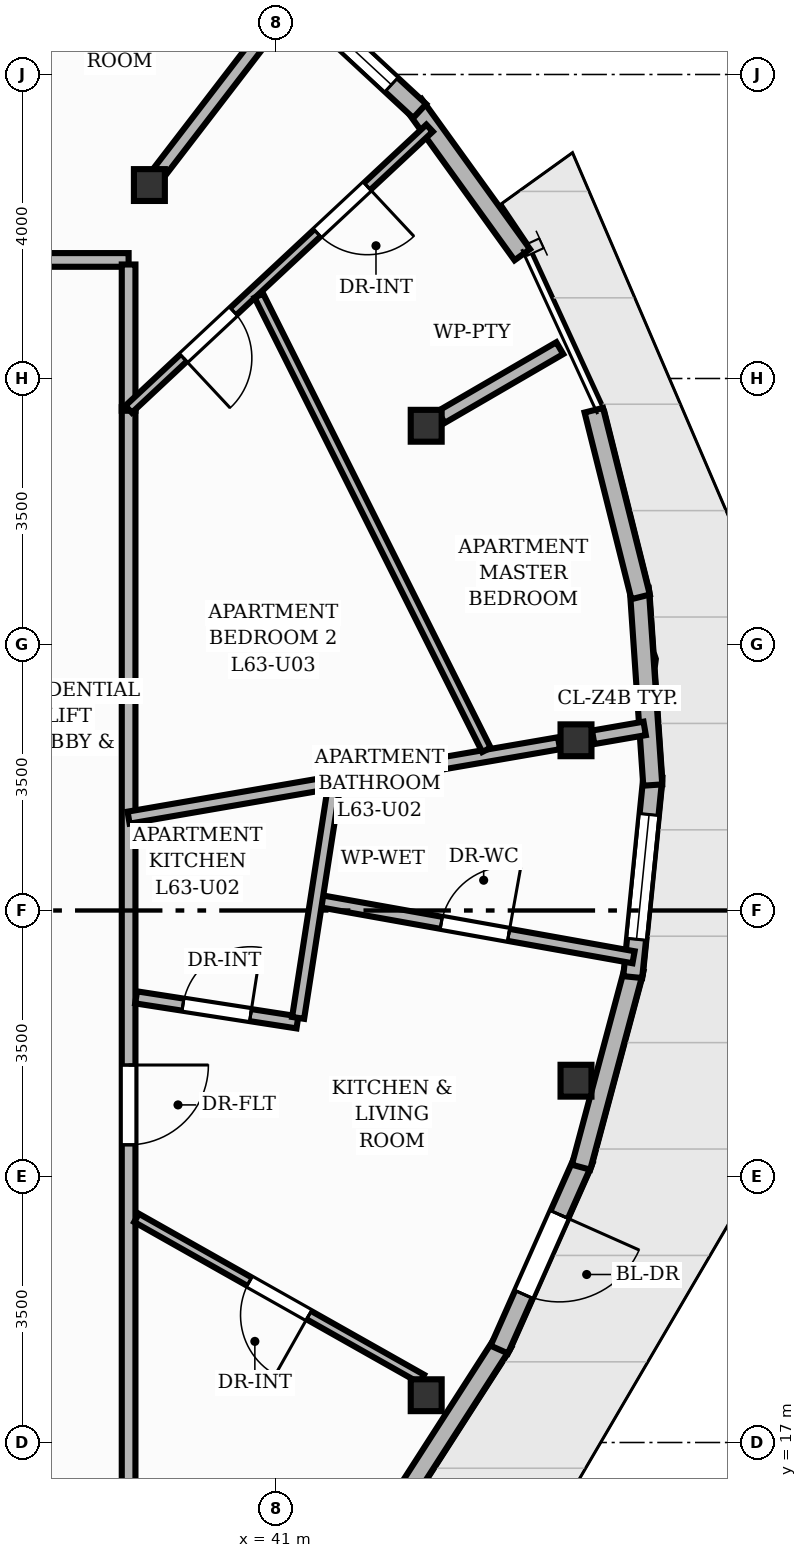
"""IFC4 building model, lengths in metres.
Left out: names, types, materials, properties, quantities, classifications, styles, units other than length and angle.
Written with IfcOpenShell. Run it as: python <this file> out.ifc"""

import sys

from ifc_helpers import new_model, si_unit, direction, frame, frame_2d, origin, origin_2d, place, context, subcontext, project, spatial, rectangle, i_section, extrude, element, fill, save


model = new_model("IFC4")
c1 = context("Model", 3, precision=1e-05, world=origin(), true_north=direction((0.0, 1.0)))
c2 = subcontext(c1, "Body", "Model", "MODEL_VIEW")
j1 = project(units=[si_unit("LENGTHUNIT", "METRE"), si_unit("PLANEANGLEUNIT", "RADIAN")], contexts=[c1])
p1 = place(None, origin())
s1 = spatial("IfcSite", under=j1, at=p1, CompositionType="ELEMENT")
p2 = place(p1, origin())
s2 = spatial("IfcBuilding", under=s1, at=p2, CompositionType="ELEMENT")
p3 = place(p2, frame((0.0, 0.0, 211.04)))
s3 = spatial("IfcBuildingStorey", under=s2, at=p3, CompositionType="ELEMENT", Elevation=211.04)
for number, where, z_axis, x_axis in (
    (1, (44.946, 26.24, 0.0), (0.0, 0.0, 1.0), (1.0, 0.0, 0.0)),
    (2, (42.975, 30.378, 0.0), (0.0, 0.0, 1.0), (1.0, 0.0, 0.0)),
    (3, (39.333, 33.545, 0.0), (0.0, 0.0, 1.0), (1.0, 0.0, 0.0)),
    (4, (42.975, 17.622, 0.0), (0.0, 0.0, 1.0), (1.0, 0.0, 0.0)),
    (5, (44.946, 21.76, 0.0), (0.0, 0.0, 1.0), (1.0, 0.0, 0.0)),
):
    element("IfcColumn", number, at=place(p3, frame(where, z_axis=z_axis, x_axis=x_axis)), inside=s3, PredefinedType="COLUMN", context=c2, shape_type="SweptSolid", body=[
        extrude(i_section(OverallWidth=0.407, OverallDepth=0.419, WebThickness=0.031, FlangeThickness=0.049, at=origin_2d()), origin(), (0.0, 0.0, 1.0), 3.2),
    ])
p4 = place(p3, frame((43.988, 18.319, 0.0), z_axis=(0.0, 0.0, 1.0), x_axis=(-0.540690479286, -0.841221615039, 0.0)))
e6 = element("IfcWall", 6, at=p4, inside=s3, PredefinedType="SOLIDWALL", context=c2, shape_type="SweptSolid", body=[
    extrude(rectangle(XDim=2.758, YDim=0.25, at=frame_2d((1.379, 0.0))), origin(), (0.0, 0.0, 1.0), 2.96),
])
p5 = place(p3, frame((45.049, 20.726, 0.0), z_axis=(0.0, 0.0, 1.0), x_axis=(-0.40624599189, -0.913763751783, 0.0)))
e7 = element("IfcWall", 7, at=p5, inside=s3, PredefinedType="SOLIDWALL", context=c2, shape_type="SweptSolid", body=[
    extrude(rectangle(XDim=2.739, YDim=0.25, at=frame_2d((1.369, 0.0))), origin(), (0.0, 0.0, 1.0), 2.96),
])
p6 = place(p5, frame((0.794, 0.0, 0.0)))
e8 = element("IfcOpeningElement", 8, at=p6, cuts=e7, PredefinedType="OPENING", context=c2, shape_type="SweptSolid", body=[
    extrude(rectangle(XDim=1.15, YDim=2.2, at=frame_2d((0.575, 1.1))), frame((0.0, 0.135, 0.0), z_axis=(0.0, -1.0, 0.0), x_axis=(1.0, 0.0, 0.0)), (0.0, 0.0, 1.0), 0.27),
])
p7 = place(p3, frame((45.712, 23.232, 0.0), z_axis=(0.0, 0.0, 1.0), x_axis=(-0.259023691836, -0.965870968126, 0.0)))
e9 = element("IfcWall", 9, at=p7, inside=s3, PredefinedType="SOLIDWALL", context=c2, shape_type="SweptSolid", body=[
    extrude(rectangle(XDim=2.701, YDim=0.25, at=frame_2d((1.351, 0.0))), origin(), (0.0, 0.0, 1.0), 2.577),
])
p8 = place(p3, frame((45.958, 25.761, 0.0), z_axis=(0.0, 0.0, 1.0), x_axis=(-0.100196668354, -0.99496765156, 0.0)))
e10 = element("IfcWall", 10, at=p8, inside=s3, PredefinedType="SOLIDWALL", context=c2, shape_type="SweptSolid", body=[
    extrude(rectangle(XDim=2.651, YDim=0.25, at=frame_2d((1.326, 0.0))), origin(), (0.0, 0.0, 1.0), 2.96),
])
p9 = place(p8, frame((0.501, 0.0, 0.85)))
e11 = element("IfcOpeningElement", 11, at=p9, cuts=e10, PredefinedType="OPENING", context=c2, shape_type="SweptSolid", body=[
    extrude(rectangle(XDim=1.65, YDim=1.55, at=frame_2d((0.825, 0.775))), frame((0.0, 0.135, 0.0), z_axis=(0.0, -1.0, 0.0), x_axis=(1.0, 0.0, 0.0)), (0.0, 0.0, 1.0), 0.27),
])
p10 = place(p3, frame((45.779, 28.237, 0.0), z_axis=(0.0, 0.0, 1.0), x_axis=(0.068469168344, -0.997653232835, 0.0)))
e12 = element("IfcWall", 12, at=p10, inside=s3, PredefinedType="SOLIDWALL", context=c2, shape_type="SweptSolid", body=[
    extrude(rectangle(XDim=2.592, YDim=0.25, at=frame_2d((1.296, 0.0))), origin(), (0.0, 0.0, 1.0), 2.96),
])
p11 = place(p3, frame((45.18, 30.583, 0.0), z_axis=(0.0, 0.0, 1.0), x_axis=(0.243170809566, -0.969983483042, 0.0)))
e13 = element("IfcWall", 13, at=p11, inside=s3, PredefinedType="SOLIDWALL", context=c2, shape_type="SweptSolid", body=[
    extrude(rectangle(XDim=2.532, YDim=0.25, at=frame_2d((1.266, 0.0))), origin(), (0.0, 0.0, 1.0), 2.96),
])
p12 = place(p3, frame((42.814, 34.605, 0.0), z_axis=(0.0, 0.0, 1.0), x_axis=(0.584824573101, -0.811159798497, 0.0)))
e14 = element("IfcWall", 14, at=p12, inside=s3, PredefinedType="SOLIDWALL", context=c2, shape_type="SweptSolid", body=[
    extrude(rectangle(XDim=2.437, YDim=0.25, at=frame_2d((1.218, 0.0))), origin(), (0.0, 0.0, 1.0), 2.96),
])
p13 = place(p3, frame((41.119, 36.161, 0.0), z_axis=(0.0, 0.0, 1.0), x_axis=(0.733441361842, -0.679752726173, 0.0)))
e15 = element("IfcWall", 15, at=p13, inside=s3, PredefinedType="SOLIDWALL", context=c2, shape_type="SweptSolid", body=[
    extrude(rectangle(XDim=2.415, YDim=0.25, at=frame_2d((1.207, 0.0))), origin(), (0.0, 0.0, 1.0), 2.96),
])
p14 = place(p13, frame((0.507, 0.0, 0.85)))
e16 = element("IfcOpeningElement", 16, at=p14, cuts=e15, PredefinedType="OPENING", context=c2, shape_type="SweptSolid", body=[
    extrude(rectangle(XDim=1.4, YDim=1.55, at=frame_2d((0.7, 0.775))), frame((0.0, 0.135, 0.0), z_axis=(0.0, -1.0, 0.0), x_axis=(1.0, 0.0, 0.0)), (0.0, 0.0, 1.0), 0.27),
])
p15 = place(p3, frame((45.173, 26.279, 0.0), z_axis=(0.0, 0.0, 1.0), x_axis=(0.985357392461, 0.170501639647, 0.0)))
e17 = element("IfcWall", 17, at=p15, inside=s3, PredefinedType="PARTITIONING", context=c2, shape_type="SweptSolid", body=[
    extrude(rectangle(XDim=0.687, YDim=0.18, at=frame_2d((0.344, 0.0))), origin(), (0.0, 0.0, 1.0), 2.403),
])
p16 = place(p3, frame((43.174, 30.493, 0.0), z_axis=(0.0, 0.0, 1.0), x_axis=(0.864637155841, 0.502396843879, 0.0)))
e18 = element("IfcWall", 18, at=p16, inside=s3, PredefinedType="PARTITIONING", context=c2, shape_type="SweptSolid", body=[
    extrude(rectangle(XDim=1.803, YDim=0.18, at=frame_2d((0.901, 0.0))), origin(), (0.0, 0.0, 1.0), 2.403),
])
p17 = place(p3, frame((39.473, 33.727, 0.0), z_axis=(0.0, 0.0, 1.0), x_axis=(0.609244614772, 0.792982344931, 0.0)))
e19 = element("IfcWall", 19, at=p17, inside=s3, PredefinedType="PARTITIONING", context=c2, shape_type="SweptSolid", body=[
    extrude(rectangle(XDim=2.861, YDim=0.18, at=frame_2d((1.43, 0.0))), origin(), (0.0, 0.0, 1.0), 2.403),
])
p18 = place(p3, frame((39.06, 30.623, 0.0), z_axis=(0.0, 0.0, 1.0), x_axis=(0.0, -1.0, 0.0)))
e20 = element("IfcWall", 20, at=p18, inside=s3, PredefinedType="PARTITIONING", context=c2, shape_type="SweptSolid", body=[
    extrude(rectangle(XDim=15.183, YDim=0.18, at=frame_2d((7.591, 0.0))), origin(), (0.0, 0.0, 1.0), 2.955),
])
p19 = place(p18, frame((8.656, 0.0, 0.0)))
e21 = element("IfcOpeningElement", 21, at=p19, cuts=e20, PredefinedType="OPENING", context=c2, shape_type="SweptSolid", body=[
    extrude(rectangle(XDim=1.05, YDim=2.15, at=frame_2d((0.525, 1.075))), frame((0.0, 0.1, 0.0), z_axis=(0.0, -1.0, 0.0), x_axis=(1.0, 0.0, 0.0)), (0.0, 0.0, 1.0), 0.2),
])
p20 = place(p3, frame((33.2, 32.56, 0.0), z_axis=(0.0, 0.0, 1.0), x_axis=(1.0, 0.0, 0.0)))
e22 = element("IfcWall", 22, at=p20, inside=s3, PredefinedType="PARTITIONING", context=c2, shape_type="SweptSolid", body=[
    extrude(rectangle(XDim=5.86, YDim=0.18, at=frame_2d((2.93, 0.0))), origin(), (0.0, 0.0, 1.0), 2.955),
])
p21 = place(p20, frame((3.227, 0.0, 0.0)))
e23 = element("IfcOpeningElement", 23, at=p21, cuts=e22, PredefinedType="OPENING", context=c2, shape_type="SweptSolid", body=[
    extrude(rectangle(XDim=1.05, YDim=2.15, at=frame_2d((0.525, 1.075))), frame((0.0, 0.1, 0.0), z_axis=(0.0, -1.0, 0.0), x_axis=(1.0, 0.0, 0.0)), (0.0, 0.0, 1.0), 0.2),
])
p22 = place(p3, frame((39.06, 32.5, 0.0), z_axis=(0.0, 0.0, 1.0), x_axis=(0.0, -1.0, 0.0)))
e24 = element("IfcWall", 24, at=p22, inside=s3, PredefinedType="PARTITIONING", context=c2, shape_type="SweptSolid", body=[
    extrude(rectangle(XDim=1.925, YDim=0.18, at=frame_2d((0.962, 0.0))), origin(), (0.0, 0.0, 1.0), 2.955),
])
p23 = place(p3, frame((41.53, 24.132, 0.0), z_axis=(0.0, 0.0, 1.0), x_axis=(0.98434454673, -0.176254966805, 0.0)))
e25 = element("IfcWall", 25, at=p23, inside=s3, PredefinedType="PLUMBINGWALL", context=c2, shape_type="SweptSolid", body=[
    extrude(rectangle(XDim=4.24, YDim=0.16, at=frame_2d((2.12, 0.0))), origin(), (0.0, 0.0, 1.0), 2.955),
])
p24 = place(p23, frame((1.67, 0.0, 0.0)))
e26 = element("IfcOpeningElement", 26, at=p24, cuts=e25, PredefinedType="OPENING", context=c2, shape_type="SweptSolid", body=[
    extrude(rectangle(XDim=0.9, YDim=2.1, at=frame_2d((0.45, 1.05))), frame((0.0, 0.09, 0.0), z_axis=(0.0, -1.0, 0.0), x_axis=(1.0, 0.0, 0.0)), (0.0, 0.0, 1.0), 0.18),
])
p25 = place(p3, frame((42.917, 17.837, 0.0), z_axis=(0.0, 0.0, 1.0), x_axis=(-0.870825482781, 0.491592288933, 0.0)))
e27 = element("IfcWall", 27, at=p25, inside=s3, PredefinedType="PARTITIONING", context=c2, shape_type="SweptSolid", body=[
    extrude(rectangle(XDim=4.309, YDim=0.125, at=frame_2d((2.154, 0.0))), origin(), (0.0, 0.0, 1.0), 2.403),
])
p26 = place(p25, frame((1.705, 0.0, 0.0)))
e28 = element("IfcOpeningElement", 28, at=p26, cuts=e27, PredefinedType="OPENING", context=c2, shape_type="SweptSolid", body=[
    extrude(rectangle(XDim=0.9, YDim=2.1, at=frame_2d((0.45, 1.05))), frame((0.0, 0.073, 0.0), z_axis=(0.0, -1.0, 0.0), x_axis=(1.0, 0.0, 0.0)), (0.0, 0.0, 1.0), 0.145),
])
p27 = place(p3, frame((39.159, 22.857, 0.0), z_axis=(0.0, 0.0, 1.0), x_axis=(0.98817241845, -0.15334689894, 0.0)))
e29 = element("IfcWall", 29, at=p27, inside=s3, PredefinedType="PLUMBINGWALL", context=c2, shape_type="SweptSolid", body=[
    extrude(rectangle(XDim=2.148, YDim=0.16, at=frame_2d((1.074, 0.0))), origin(), (0.0, 0.0, 1.0), 2.403),
])
p28 = place(p27, frame((0.624, 0.0, 0.0)))
e30 = element("IfcOpeningElement", 30, at=p28, cuts=e29, PredefinedType="OPENING", context=c2, shape_type="SweptSolid", body=[
    extrude(rectangle(XDim=0.9, YDim=2.1, at=frame_2d((0.45, 1.05))), frame((0.0, 0.09, 0.0), z_axis=(0.0, -1.0, 0.0), x_axis=(1.0, 0.0, 0.0)), (0.0, 0.0, 1.0), 0.18),
])
p29 = place(p3, frame((41.29, 22.587, 0.0), z_axis=(0.0, 0.0, 1.0), x_axis=(0.153371357182, 0.988168622653, 0.0)))
e31 = element("IfcWall", 31, at=p29, inside=s3, PredefinedType="PLUMBINGWALL", context=c2, shape_type="SweptSolid", body=[
    extrude(rectangle(XDim=3.141, YDim=0.16, at=frame_2d((1.57, 0.0))), origin(), (0.0, 0.0, 1.0), 2.955),
])
p30 = place(p3, frame((39.06, 25.222, 0.0), z_axis=(0.0, 0.0, 1.0), x_axis=(0.985376851804, 0.170389142636, 0.0)))
e32 = element("IfcWall", 32, at=p30, inside=s3, PredefinedType="PLUMBINGWALL", context=c2, shape_type="SweptSolid", body=[
    extrude(rectangle(XDim=5.747, YDim=0.16, at=frame_2d((2.874, 0.0))), origin(), (0.0, 0.0, 1.0), 2.403),
])
p31 = place(p3, frame((43.02, 34.294, 0.0), z_axis=(0.0, 0.0, 1.0), x_axis=(-0.730757039427, -0.682637641307, 0.0)))
e33 = element("IfcWall", 33, at=p31, inside=s3, PredefinedType="PARTITIONING", context=c2, shape_type="SweptSolid", body=[
    extrude(rectangle(XDim=5.419, YDim=0.125, at=frame_2d((2.709, 0.0))), origin(), (0.0, 0.0, 1.0), 2.955),
])
p32 = place(p31, frame((1.122, 0.0, 0.0)))
e34 = element("IfcOpeningElement", 34, at=p32, cuts=e33, PredefinedType="OPENING", context=c2, shape_type="SweptSolid", body=[
    extrude(rectangle(XDim=0.9, YDim=2.1, at=frame_2d((0.45, 1.05))), frame((0.0, 0.073, 0.0), z_axis=(0.0, -1.0, 0.0), x_axis=(1.0, 0.0, 0.0)), (0.0, 0.0, 1.0), 0.145),
])
p33 = place(p31, frame((3.531, 0.0, 0.0)))
e35 = element("IfcOpeningElement", 35, at=p33, cuts=e33, PredefinedType="OPENING", context=c2, shape_type="SweptSolid", body=[
    extrude(rectangle(XDim=0.9, YDim=2.1, at=frame_2d((0.45, 1.05))), frame((0.0, 0.073, 0.0), z_axis=(0.0, -1.0, 0.0), x_axis=(1.0, 0.0, 0.0)), (0.0, 0.0, 1.0), 0.145),
])
p34 = place(p3, frame((43.768, 26.114, 0.0), z_axis=(0.0, 0.0, 1.0), x_axis=(-0.447958394428, 0.894054403748, 0.0)))
e36 = element("IfcWall", 36, at=p34, inside=s3, PredefinedType="PARTITIONING", context=c2, shape_type="SweptSolid", body=[
    extrude(rectangle(XDim=6.686, YDim=0.125, at=frame_2d((3.343, 0.0))), origin(), (0.0, 0.0, 1.0), 2.488),
])
p35 = place(p6, origin())
e37 = element("IfcDoor", 37, at=p35, inside=s3, OperationType="SINGLE_SWING_LEFT", PredefinedType="DOOR", context=c2, shape_type="SweptSolid", body=[
    extrude(rectangle(XDim=1.15, YDim=2.2, at=frame_2d((0.575, 1.1))), frame((0.0, 0.025, 0.0), z_axis=(0.0, -1.0, 0.0), x_axis=(1.0, 0.0, 0.0)), (0.0, 0.0, 1.0), 0.05),
])
fill(e8, e37)
p36 = place(p9, origin())
e38 = element("IfcWindow", 38, at=p36, inside=s3, PartitioningType="SINGLE_PANEL", PredefinedType="WINDOW", context=c2, shape_type="SweptSolid", body=[
    extrude(rectangle(XDim=1.65, YDim=1.55, at=frame_2d((0.825, 0.775))), frame((0.0, 0.03, 0.0), z_axis=(0.0, -1.0, 0.0), x_axis=(1.0, 0.0, 0.0)), (0.0, 0.0, 1.0), 0.06),
])
fill(e11, e38)
p37 = place(p14, origin())
e39 = element("IfcWindow", 39, at=p37, inside=s3, PartitioningType="SINGLE_PANEL", PredefinedType="WINDOW", context=c2, shape_type="SweptSolid", body=[
    extrude(rectangle(XDim=1.4, YDim=1.55, at=frame_2d((0.7, 0.775))), frame((0.0, 0.03, 0.0), z_axis=(0.0, -1.0, 0.0), x_axis=(1.0, 0.0, 0.0)), (0.0, 0.0, 1.0), 0.06),
])
fill(e16, e39)
p38 = place(p19, origin())
e40 = element("IfcDoor", 40, at=p38, inside=s3, OperationType="SINGLE_SWING_LEFT", PredefinedType="DOOR", context=c2, shape_type="SweptSolid", body=[
    extrude(rectangle(XDim=1.05, YDim=2.15, at=frame_2d((0.525, 1.075))), frame((0.0, 0.025, 0.0), z_axis=(0.0, -1.0, 0.0), x_axis=(1.0, 0.0, 0.0)), (0.0, 0.0, 1.0), 0.05),
])
fill(e21, e40)
p39 = place(p24, origin())
e41 = element("IfcDoor", 41, at=p39, inside=s3, OperationType="SINGLE_SWING_RIGHT", PredefinedType="DOOR", context=c2, shape_type="SweptSolid", body=[
    extrude(rectangle(XDim=0.9, YDim=2.1, at=frame_2d((0.45, 1.05))), frame((0.0, 0.025, 0.0), z_axis=(0.0, -1.0, 0.0), x_axis=(1.0, 0.0, 0.0)), (0.0, 0.0, 1.0), 0.05),
])
fill(e26, e41)
p40 = place(p26, origin())
e42 = element("IfcDoor", 42, at=p40, inside=s3, OperationType="SINGLE_SWING_LEFT", PredefinedType="DOOR", context=c2, shape_type="SweptSolid", body=[
    extrude(rectangle(XDim=0.9, YDim=2.1, at=frame_2d((0.45, 1.05))), frame((0.0, 0.025, 0.0), z_axis=(0.0, -1.0, 0.0), x_axis=(1.0, 0.0, 0.0)), (0.0, 0.0, 1.0), 0.05),
])
fill(e28, e42)
p41 = place(p28, origin())
e43 = element("IfcDoor", 43, at=p41, inside=s3, OperationType="SINGLE_SWING_RIGHT", PredefinedType="DOOR", context=c2, shape_type="SweptSolid", body=[
    extrude(rectangle(XDim=0.9, YDim=2.1, at=frame_2d((0.45, 1.05))), frame((0.0, 0.025, 0.0), z_axis=(0.0, -1.0, 0.0), x_axis=(1.0, 0.0, 0.0)), (0.0, 0.0, 1.0), 0.05),
])
fill(e30, e43)
p42 = place(p32, origin())
e44 = element("IfcDoor", 44, at=p42, inside=s3, OperationType="SINGLE_SWING_LEFT", PredefinedType="DOOR", context=c2, shape_type="SweptSolid", body=[
    extrude(rectangle(XDim=0.9, YDim=2.1, at=frame_2d((0.45, 1.05))), frame((0.0, 0.025, 0.0), z_axis=(0.0, -1.0, 0.0), x_axis=(1.0, 0.0, 0.0)), (0.0, 0.0, 1.0), 0.05),
])
fill(e34, e44)
p43 = place(p33, origin())
e45 = element("IfcDoor", 45, at=p43, inside=s3, OperationType="SINGLE_SWING_RIGHT", PredefinedType="DOOR", context=c2, shape_type="SweptSolid", body=[
    extrude(rectangle(XDim=0.9, YDim=2.1, at=frame_2d((0.45, 1.05))), frame((0.0, 0.025, 0.0), z_axis=(0.0, -1.0, 0.0), x_axis=(1.0, 0.0, 0.0)), (0.0, 0.0, 1.0), 0.05),
])
fill(e35, e45)
save(model, sys.argv[1])
